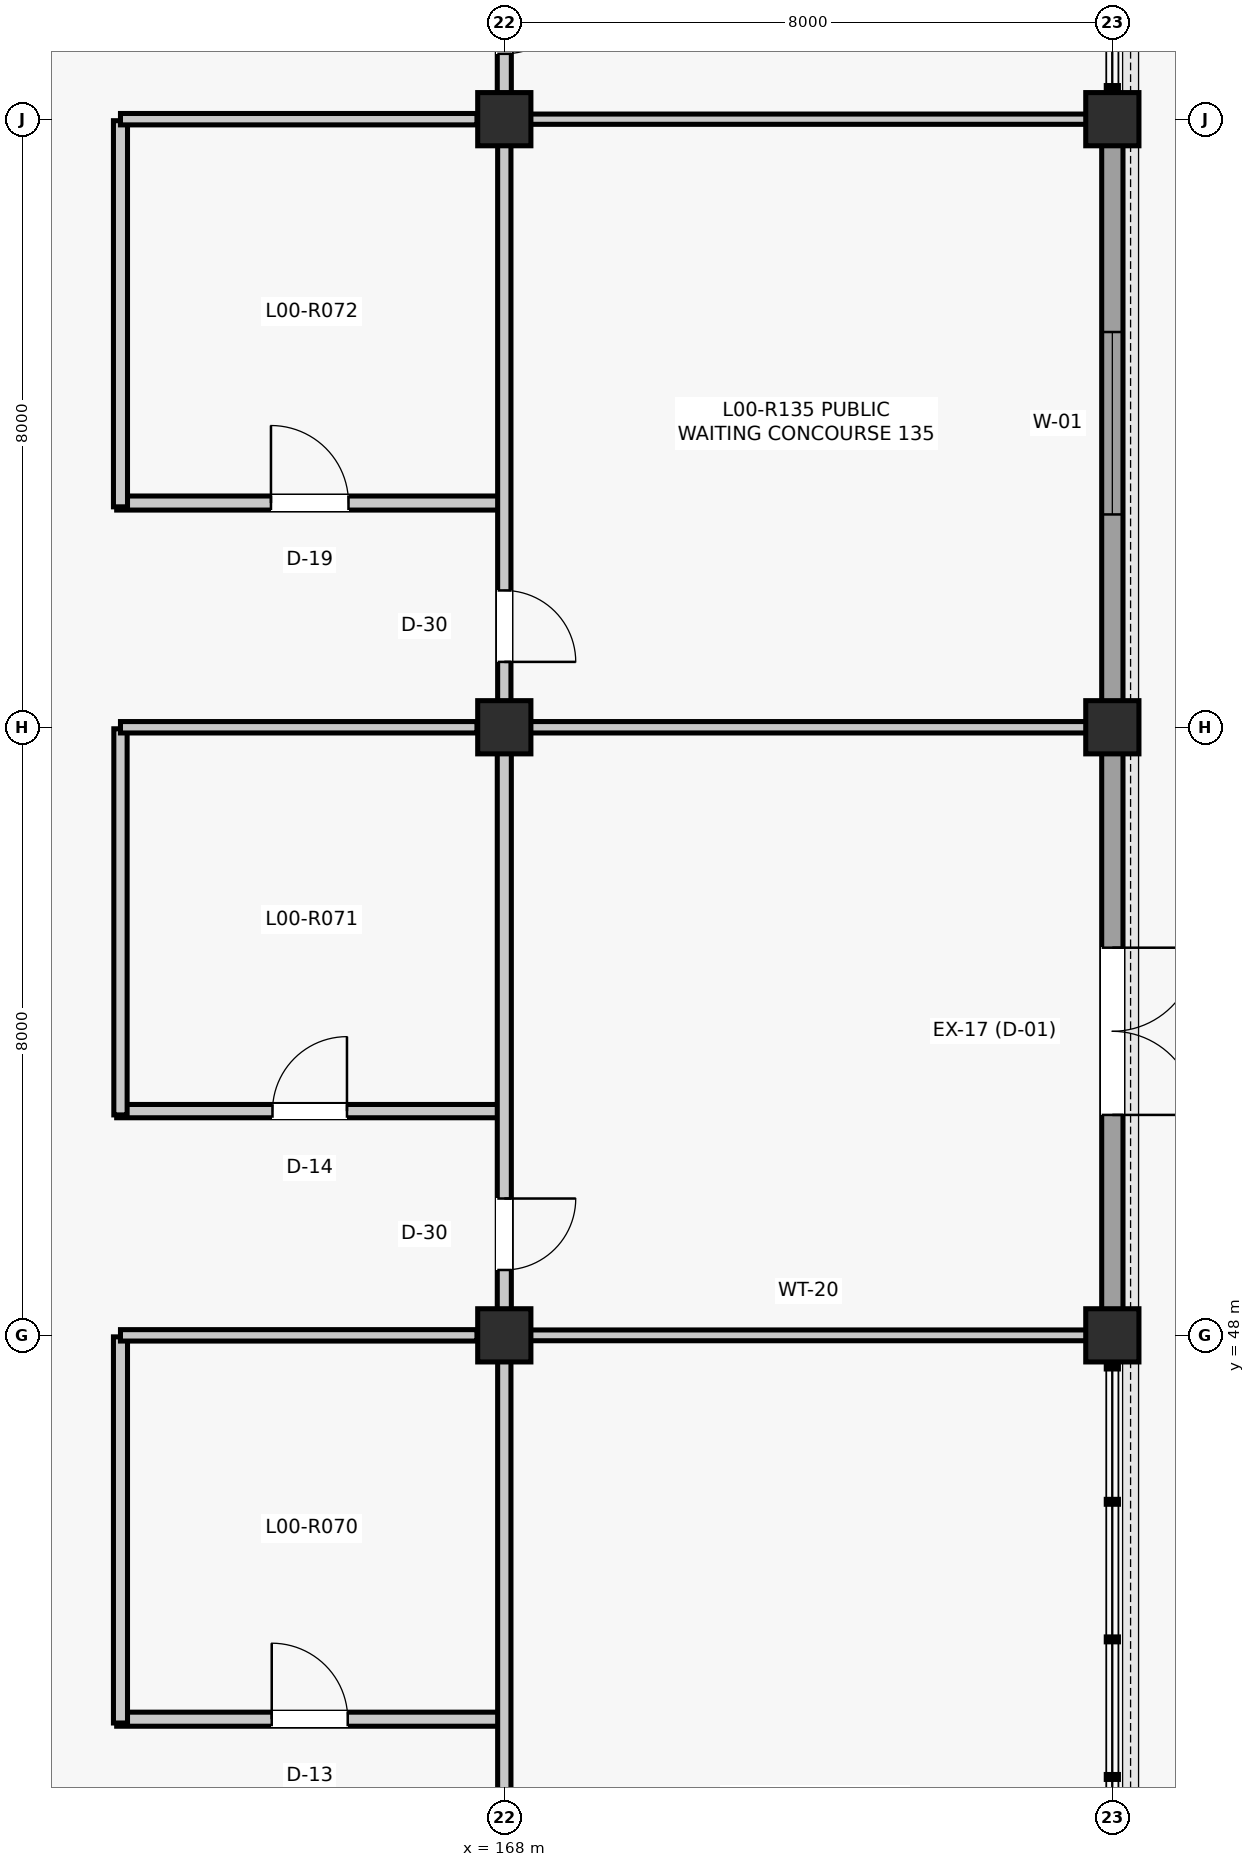
"""IFC4 building model, lengths in metres.
Left out: names, types, materials, properties, quantities, classifications, styles, units other than length and angle.
Written with IfcOpenShell. Run it as: python <this file> out.ifc"""

import sys

from ifc_helpers import new_model, si_unit, direction, frame, frame_2d, origin, origin_2d, place, context, subcontext, project, spatial, rectangle, extrude, element, fill, save


model = new_model("IFC4")
c1 = context("Model", 3, precision=1e-05, world=origin(), true_north=direction((0.0, 1.0)))
c2 = subcontext(c1, "Body", "Model", "MODEL_VIEW")
j1 = project(units=[si_unit("LENGTHUNIT", "METRE"), si_unit("PLANEANGLEUNIT", "RADIAN")], contexts=[c1])
p1 = place(None, origin())
s1 = spatial("IfcSite", under=j1, at=p1, CompositionType="ELEMENT")
p2 = place(p1, origin())
s2 = spatial("IfcBuilding", under=s1, at=p2, CompositionType="ELEMENT")
p3 = place(p2, origin())
s3 = spatial("IfcBuildingStorey", under=s2, at=p3, CompositionType="ELEMENT", Elevation=0.0)
for number, where, z_axis, x_axis in (
    (1, (168.0, 48.0, 0.0), (0.0, 0.0, 1.0), (1.0, 0.0, 0.0)),
    (2, (168.0, 56.0, 0.0), (0.0, 0.0, 1.0), (1.0, 0.0, 0.0)),
    (3, (168.0, 64.0, 0.0), (0.0, 0.0, 1.0), (1.0, 0.0, 0.0)),
    (4, (176.0, 48.0, 0.0), (0.0, 0.0, 1.0), (1.0, 0.0, 0.0)),
    (5, (176.0, 56.0, 0.0), (0.0, 0.0, 1.0), (1.0, 0.0, 0.0)),
    (6, (176.0, 64.0, 0.0), (0.0, 0.0, 1.0), (1.0, 0.0, 0.0)),
):
    element("IfcColumn", number, at=place(p3, frame(where, z_axis=z_axis, x_axis=x_axis)), inside=s3, PredefinedType="COLUMN", context=c2, shape_type="SweptSolid", body=[
        extrude(rectangle(XDim=0.7, YDim=0.7, at=origin_2d()), origin(), (0.0, 0.0, 1.0), 5.28),
    ])
p4 = place(p3, frame((176.0, 48.335, 0.0), z_axis=(0.0, 0.0, 1.0), x_axis=(0.0, 1.0, 0.0)))
e7 = element("IfcWall", 7, at=p4, inside=s3, PredefinedType="SOLIDWALL", context=c2, shape_type="SweptSolid", body=[
    extrude(rectangle(XDim=7.33, YDim=0.28, at=frame_2d((3.665, 0.0))), origin(), (0.0, 0.0, 1.0), 4.61),
])
p5 = place(p4, frame((2.565, 0.0, 0.0)))
e8 = element("IfcOpeningElement", 8, at=p5, cuts=e7, PredefinedType="OPENING", context=c2, shape_type="SweptSolid", body=[
    extrude(rectangle(XDim=2.2, YDim=2.5, at=frame_2d((1.1, 1.25))), frame((0.0, 0.15, 0.0), z_axis=(0.0, -1.0, 0.0), x_axis=(1.0, 0.0, 0.0)), (0.0, 0.0, 1.0), 0.3),
])
p6 = place(p3, frame((176.0, 56.335, 0.0), z_axis=(0.0, 0.0, 1.0), x_axis=(0.0, 1.0, 0.0)))
e9 = element("IfcWall", 9, at=p6, inside=s3, PredefinedType="SOLIDWALL", context=c2, shape_type="SweptSolid", body=[
    extrude(rectangle(XDim=7.33, YDim=0.28, at=frame_2d((3.665, 0.0))), origin(), (0.0, 0.0, 1.0), 4.674),
])
p7 = place(p6, frame((2.465, 0.0, 0.9)))
e10 = element("IfcOpeningElement", 10, at=p7, cuts=e9, PredefinedType="OPENING", context=c2, shape_type="SweptSolid", body=[
    extrude(rectangle(XDim=2.4, YDim=2.8, at=frame_2d((1.2, 1.4))), frame((0.0, 0.15, 0.0), z_axis=(0.0, -1.0, 0.0), x_axis=(1.0, 0.0, 0.0)), (0.0, 0.0, 1.0), 0.3),
])
p8 = place(p3, frame((162.9, 42.95, 0.0), z_axis=(0.0, 0.0, 1.0), x_axis=(1.0, 0.0, 0.0)))
e11 = element("IfcWall", 11, at=p8, inside=s3, PredefinedType="PARTITIONING", context=c2, shape_type="SweptSolid", body=[
    extrude(rectangle(XDim=5.08, YDim=0.185, at=frame_2d((2.54, 0.0))), origin(), (0.0, 0.0, 1.0), 4.404),
])
p9 = place(p8, frame((2.04, 0.0, 0.0)))
e12 = element("IfcOpeningElement", 12, at=p9, cuts=e11, PredefinedType="OPENING", context=c2, shape_type="SweptSolid", body=[
    extrude(rectangle(XDim=1.0, YDim=2.15, at=frame_2d((0.5, 1.075))), frame((0.0, 0.103, 0.0), z_axis=(0.0, -1.0, 0.0), x_axis=(1.0, 0.0, 0.0)), (0.0, 0.0, 1.0), 0.205),
])
p10 = place(p3, frame((162.95, 42.9, 0.0), z_axis=(0.0, 0.0, 1.0), x_axis=(0.0, 1.0, 0.0)))
e13 = element("IfcWall", 13, at=p10, inside=s3, PredefinedType="PARTITIONING", context=c2, shape_type="SweptSolid", body=[
    extrude(rectangle(XDim=5.08, YDim=0.185, at=frame_2d((2.54, 0.0))), origin(), (0.0, 0.0, 1.0), 4.336),
])
p11 = place(p3, frame((162.95, 48.0, 0.0), z_axis=(0.0, 0.0, 1.0), x_axis=(1.0, 0.0, 0.0)))
e14 = element("IfcWall", 14, at=p11, inside=s3, PredefinedType="PARTITIONING", context=c2, shape_type="SweptSolid", body=[
    extrude(rectangle(XDim=4.69, YDim=0.15, at=frame_2d((2.345, 0.0))), origin(), (0.0, 0.0, 1.0), 4.336),
])
p12 = place(p3, frame((162.9, 50.95, 0.0), z_axis=(0.0, 0.0, 1.0), x_axis=(1.0, 0.0, 0.0)))
e15 = element("IfcWall", 15, at=p12, inside=s3, PredefinedType="PARTITIONING", context=c2, shape_type="SweptSolid", body=[
    extrude(rectangle(XDim=5.08, YDim=0.175, at=frame_2d((2.54, 0.0))), origin(), (0.0, 0.0, 1.0), 4.471),
])
p13 = place(p12, frame((2.05, 0.0, 0.0)))
e16 = element("IfcOpeningElement", 16, at=p13, cuts=e15, PredefinedType="OPENING", context=c2, shape_type="SweptSolid", body=[
    extrude(rectangle(XDim=0.98, YDim=2.15, at=frame_2d((0.49, 1.075))), frame((0.0, 0.097, 0.0), z_axis=(0.0, -1.0, 0.0), x_axis=(1.0, 0.0, 0.0)), (0.0, 0.0, 1.0), 0.195),
])
p14 = place(p3, frame((162.95, 50.9, 0.0), z_axis=(0.0, 0.0, 1.0), x_axis=(0.0, 1.0, 0.0)))
e17 = element("IfcWall", 17, at=p14, inside=s3, PredefinedType="PARTITIONING", context=c2, shape_type="SweptSolid", body=[
    extrude(rectangle(XDim=5.08, YDim=0.175, at=frame_2d((2.54, 0.0))), origin(), (0.0, 0.0, 1.0), 4.404),
])
p15 = place(p3, frame((162.95, 56.0, 0.0), z_axis=(0.0, 0.0, 1.0), x_axis=(1.0, 0.0, 0.0)))
e18 = element("IfcWall", 18, at=p15, inside=s3, PredefinedType="PARTITIONING", context=c2, shape_type="SweptSolid", body=[
    extrude(rectangle(XDim=4.69, YDim=0.15, at=frame_2d((2.345, 0.0))), origin(), (0.0, 0.0, 1.0), 4.404),
])
p16 = place(p3, frame((162.9, 58.95, 0.0), z_axis=(0.0, 0.0, 1.0), x_axis=(1.0, 0.0, 0.0)))
e19 = element("IfcWall", 19, at=p16, inside=s3, PredefinedType="PARTITIONING", context=c2, shape_type="SweptSolid", body=[
    extrude(rectangle(XDim=5.08, YDim=0.185, at=frame_2d((2.54, 0.0))), origin(), (0.0, 0.0, 1.0), 4.403),
])
p17 = place(p16, frame((2.03, 0.0, 0.0)))
e20 = element("IfcOpeningElement", 20, at=p17, cuts=e19, PredefinedType="OPENING", context=c2, shape_type="SweptSolid", body=[
    extrude(rectangle(XDim=1.02, YDim=2.2, at=frame_2d((0.51, 1.1))), frame((0.0, 0.103, 0.0), z_axis=(0.0, -1.0, 0.0), x_axis=(1.0, 0.0, 0.0)), (0.0, 0.0, 1.0), 0.205),
])
p18 = place(p3, frame((162.95, 58.9, 0.0), z_axis=(0.0, 0.0, 1.0), x_axis=(0.0, 1.0, 0.0)))
e21 = element("IfcWall", 21, at=p18, inside=s3, PredefinedType="PARTITIONING", context=c2, shape_type="SweptSolid", body=[
    extrude(rectangle(XDim=5.08, YDim=0.185, at=frame_2d((2.54, 0.0))), origin(), (0.0, 0.0, 1.0), 4.332),
])
p19 = place(p3, frame((162.95, 64.0, 0.0), z_axis=(0.0, 0.0, 1.0), x_axis=(1.0, 0.0, 0.0)))
e22 = element("IfcWall", 22, at=p19, inside=s3, PredefinedType="PARTITIONING", context=c2, shape_type="SweptSolid", body=[
    extrude(rectangle(XDim=4.69, YDim=0.15, at=frame_2d((2.345, 0.0))), origin(), (0.0, 0.0, 1.0), 4.332),
])
p20 = place(p3, frame((168.0, 40.34, 0.0), z_axis=(0.0, 0.0, 1.0), x_axis=(0.0, 1.0, 0.0)))
e23 = element("IfcWall", 23, at=p20, inside=s3, PredefinedType="PARTITIONING", context=c2, shape_type="SweptSolid", body=[
    extrude(rectangle(XDim=7.32, YDim=0.175, at=frame_2d((3.66, 0.0))), origin(), (0.0, 0.0, 1.0), 4.404),
])
p21 = place(p20, frame((0.52, 0.0, 0.0)))
e24 = element("IfcOpeningElement", 24, at=p21, cuts=e23, PredefinedType="OPENING", context=c2, shape_type="SweptSolid", body=[
    extrude(rectangle(XDim=0.94, YDim=2.12, at=frame_2d((0.47, 1.06))), frame((0.0, 0.097, 0.0), z_axis=(0.0, -1.0, 0.0), x_axis=(1.0, 0.0, 0.0)), (0.0, 0.0, 1.0), 0.195),
])
p22 = place(p3, frame((168.0, 48.34, 0.0), z_axis=(0.0, 0.0, 1.0), x_axis=(0.0, 1.0, 0.0)))
e25 = element("IfcWall", 25, at=p22, inside=s3, PredefinedType="PARTITIONING", context=c2, shape_type="SweptSolid", body=[
    extrude(rectangle(XDim=7.32, YDim=0.185, at=frame_2d((3.66, 0.0))), origin(), (0.0, 0.0, 1.0), 4.471),
])
p23 = place(p22, frame((0.52, 0.0, 0.0)))
e26 = element("IfcOpeningElement", 26, at=p23, cuts=e25, PredefinedType="OPENING", context=c2, shape_type="SweptSolid", body=[
    extrude(rectangle(XDim=0.94, YDim=2.12, at=frame_2d((0.47, 1.06))), frame((0.0, 0.103, 0.0), z_axis=(0.0, -1.0, 0.0), x_axis=(1.0, 0.0, 0.0)), (0.0, 0.0, 1.0), 0.205),
])
p24 = place(p3, frame((168.0, 56.34, 0.0), z_axis=(0.0, 0.0, 1.0), x_axis=(0.0, 1.0, 0.0)))
e27 = element("IfcWall", 27, at=p24, inside=s3, PredefinedType="PARTITIONING", context=c2, shape_type="SweptSolid", body=[
    extrude(rectangle(XDim=7.32, YDim=0.175, at=frame_2d((3.66, 0.0))), origin(), (0.0, 0.0, 1.0), 4.403),
])
p25 = place(p24, frame((0.52, 0.0, 0.0)))
e28 = element("IfcOpeningElement", 28, at=p25, cuts=e27, PredefinedType="OPENING", context=c2, shape_type="SweptSolid", body=[
    extrude(rectangle(XDim=0.94, YDim=2.12, at=frame_2d((0.47, 1.06))), frame((0.0, 0.097, 0.0), z_axis=(0.0, -1.0, 0.0), x_axis=(1.0, 0.0, 0.0)), (0.0, 0.0, 1.0), 0.195),
])
p26 = place(p3, frame((168.0, 64.34, 0.0), z_axis=(0.0, 0.0, 1.0), x_axis=(0.0, 1.0, 0.0)))
e29 = element("IfcWall", 29, at=p26, inside=s3, PredefinedType="PARTITIONING", context=c2, shape_type="SweptSolid", body=[
    extrude(rectangle(XDim=7.32, YDim=0.185, at=frame_2d((3.66, 0.0))), origin(), (0.0, 0.0, 1.0), 4.412),
])
p27 = place(p26, frame((0.52, 0.0, 0.0)))
e30 = element("IfcOpeningElement", 30, at=p27, cuts=e29, PredefinedType="OPENING", context=c2, shape_type="SweptSolid", body=[
    extrude(rectangle(XDim=0.94, YDim=2.12, at=frame_2d((0.47, 1.06))), frame((0.0, 0.103, 0.0), z_axis=(0.0, -1.0, 0.0), x_axis=(1.0, 0.0, 0.0)), (0.0, 0.0, 1.0), 0.205),
])
p28 = place(p3, frame((168.34, 48.0, 0.0), z_axis=(0.0, 0.0, 1.0), x_axis=(1.0, 0.0, 0.0)))
e31 = element("IfcWall", 31, at=p28, inside=s3, PredefinedType="PARTITIONING", context=c2, shape_type="SweptSolid", body=[
    extrude(rectangle(XDim=7.32, YDim=0.142, at=frame_2d((3.66, 0.0))), origin(), (0.0, 0.0, 1.0), 4.404),
])
p29 = place(p3, frame((168.34, 56.0, 0.0), z_axis=(0.0, 0.0, 1.0), x_axis=(1.0, 0.0, 0.0)))
e32 = element("IfcWall", 32, at=p29, inside=s3, PredefinedType="PARTITIONING", context=c2, shape_type="SweptSolid", body=[
    extrude(rectangle(XDim=7.32, YDim=0.15, at=frame_2d((3.66, 0.0))), origin(), (0.0, 0.0, 1.0), 4.327),
])
p30 = place(p3, frame((168.34, 64.0, 0.0), z_axis=(0.0, 0.0, 1.0), x_axis=(1.0, 0.0, 0.0)))
e33 = element("IfcWall", 33, at=p30, inside=s3, PredefinedType="PARTITIONING", context=c2, shape_type="SweptSolid", body=[
    extrude(rectangle(XDim=7.32, YDim=0.135, at=frame_2d((3.66, 0.0))), origin(), (0.0, 0.0, 1.0), 4.403),
])
p31 = place(p5, frame((2.2, 0.0, 0.0), z_axis=(0.0, 0.0, 1.0), x_axis=(-1.0, 0.0, 0.0)))
e34 = element("IfcDoor", 34, at=p31, inside=s3, OperationType="DOUBLE_DOOR_SINGLE_SWING", PredefinedType="DOOR", context=c2, shape_type="SweptSolid", body=[
    extrude(rectangle(XDim=2.2, YDim=2.5, at=frame_2d((1.1, 1.25))), frame((0.0, 0.025, 0.0), z_axis=(0.0, -1.0, 0.0), x_axis=(1.0, 0.0, 0.0)), (0.0, 0.0, 1.0), 0.05),
])
fill(e8, e34)
p32 = place(p7, origin())
e35 = element("IfcWindow", 35, at=p32, inside=s3, PartitioningType="SINGLE_PANEL", PredefinedType="WINDOW", context=c2, shape_type="SweptSolid", body=[
    extrude(rectangle(XDim=2.4, YDim=2.8, at=frame_2d((1.2, 1.4))), frame((0.0, 0.03, 0.0), z_axis=(0.0, -1.0, 0.0), x_axis=(1.0, 0.0, 0.0)), (0.0, 0.0, 1.0), 0.06),
])
fill(e10, e35)
p33 = place(p9, origin())
e36 = element("IfcDoor", 36, at=p33, inside=s3, OperationType="SINGLE_SWING_LEFT", PredefinedType="DOOR", context=c2, shape_type="SweptSolid", body=[
    extrude(rectangle(XDim=1.0, YDim=2.15, at=frame_2d((0.5, 1.075))), frame((0.0, 0.025, 0.0), z_axis=(0.0, -1.0, 0.0), x_axis=(1.0, 0.0, 0.0)), (0.0, 0.0, 1.0), 0.05),
])
fill(e12, e36)
p34 = place(p13, origin())
e37 = element("IfcDoor", 37, at=p34, inside=s3, OperationType="SINGLE_SWING_RIGHT", PredefinedType="DOOR", context=c2, shape_type="SweptSolid", body=[
    extrude(rectangle(XDim=0.98, YDim=2.15, at=frame_2d((0.49, 1.075))), frame((0.0, 0.025, 0.0), z_axis=(0.0, -1.0, 0.0), x_axis=(1.0, 0.0, 0.0)), (0.0, 0.0, 1.0), 0.05),
])
fill(e16, e37)
p35 = place(p17, origin())
e38 = element("IfcDoor", 38, at=p35, inside=s3, OperationType="SINGLE_SWING_LEFT", PredefinedType="DOOR", context=c2, shape_type="SweptSolid", body=[
    extrude(rectangle(XDim=1.02, YDim=2.2, at=frame_2d((0.51, 1.1))), frame((0.0, 0.025, 0.0), z_axis=(0.0, -1.0, 0.0), x_axis=(1.0, 0.0, 0.0)), (0.0, 0.0, 1.0), 0.05),
])
fill(e20, e38)
p36 = place(p23, frame((0.94, 0.0, 0.0), z_axis=(0.0, 0.0, 1.0), x_axis=(-1.0, 0.0, 0.0)))
e39 = element("IfcDoor", 39, at=p36, inside=s3, OperationType="SINGLE_SWING_RIGHT", PredefinedType="DOOR", context=c2, shape_type="SweptSolid", body=[
    extrude(rectangle(XDim=0.94, YDim=2.12, at=frame_2d((0.47, 1.06))), frame((0.0, 0.025, 0.0), z_axis=(0.0, -1.0, 0.0), x_axis=(1.0, 0.0, 0.0)), (0.0, 0.0, 1.0), 0.05),
])
fill(e26, e39)
p37 = place(p25, frame((0.94, 0.0, 0.0), z_axis=(0.0, 0.0, 1.0), x_axis=(-1.0, 0.0, 0.0)))
e40 = element("IfcDoor", 40, at=p37, inside=s3, OperationType="SINGLE_SWING_LEFT", PredefinedType="DOOR", context=c2, shape_type="SweptSolid", body=[
    extrude(rectangle(XDim=0.94, YDim=2.12, at=frame_2d((0.47, 1.06))), frame((0.0, 0.025, 0.0), z_axis=(0.0, -1.0, 0.0), x_axis=(1.0, 0.0, 0.0)), (0.0, 0.0, 1.0), 0.05),
])
fill(e28, e40)
p38 = place(p27, frame((0.94, 0.0, 0.0), z_axis=(0.0, 0.0, 1.0), x_axis=(-1.0, 0.0, 0.0)))
e41 = element("IfcDoor", 41, at=p38, inside=s3, OperationType="SINGLE_SWING_RIGHT", PredefinedType="DOOR", context=c2, shape_type="SweptSolid", body=[
    extrude(rectangle(XDim=0.94, YDim=2.12, at=frame_2d((0.47, 1.06))), frame((0.0, 0.025, 0.0), z_axis=(0.0, -1.0, 0.0), x_axis=(1.0, 0.0, 0.0)), (0.0, 0.0, 1.0), 0.05),
])
fill(e30, e41)
save(model, sys.argv[1])
